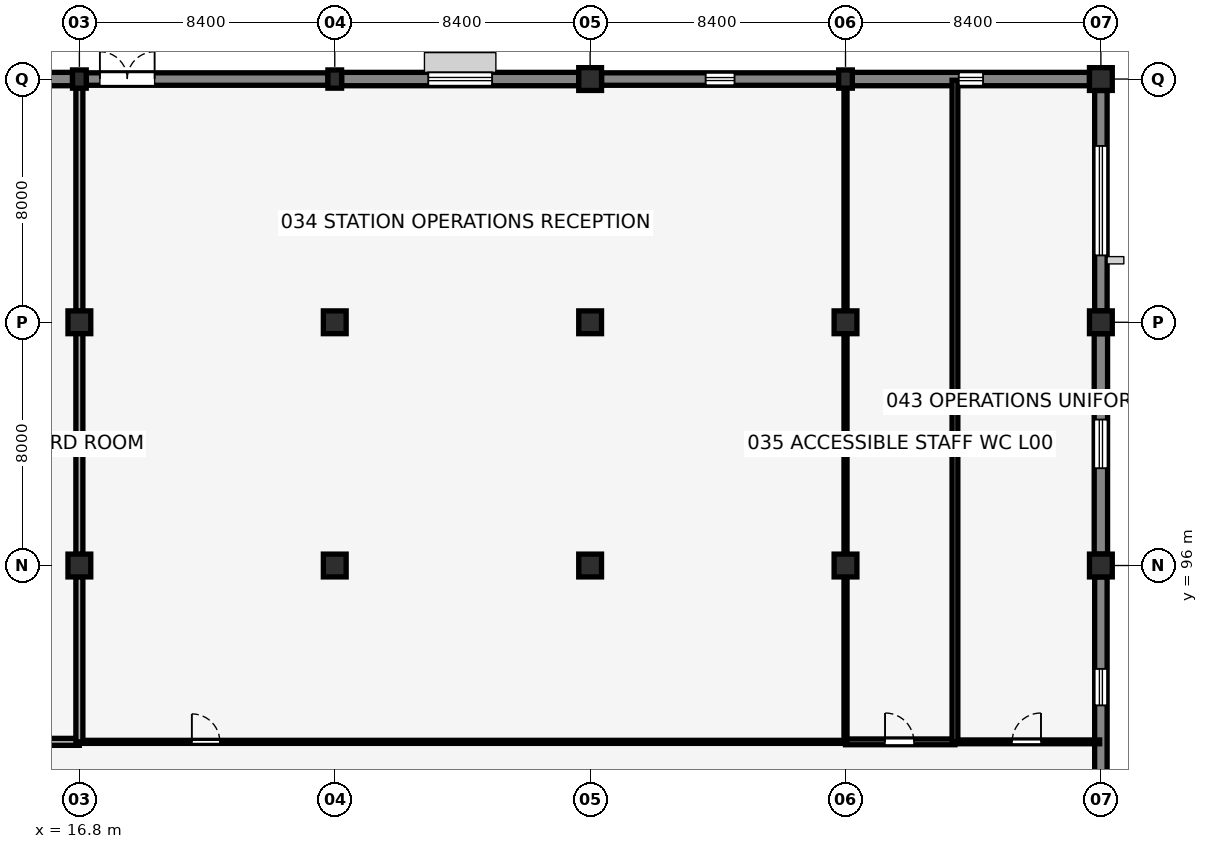
"""IFC4 building model, lengths in metres.
Left out: names, types, materials, properties, quantities, classifications, styles, units other than length and angle.
Written with IfcOpenShell. Run it as: python <this file> out.ifc"""

import sys

from ifc_helpers import new_model, si_unit, direction, frame, frame_2d, origin, origin_2d, place, context, subcontext, project, spatial, rectangle, extrude, element, fill, save


model = new_model("IFC4")
c1 = context("Model", 3, precision=1e-05, world=origin(), true_north=direction((0.0, 1.0)))
c2 = subcontext(c1, "Body", "Model", "MODEL_VIEW")
j1 = project(units=[si_unit("LENGTHUNIT", "METRE"), si_unit("PLANEANGLEUNIT", "RADIAN")], contexts=[c1])
p1 = place(None, origin())
s1 = spatial("IfcSite", under=j1, at=p1, CompositionType="ELEMENT")
p2 = place(p1, origin())
s2 = spatial("IfcBuilding", under=s1, at=p2, CompositionType="ELEMENT")
p3 = place(p2, origin())
s3 = spatial("IfcBuildingStorey", under=s2, at=p3, CompositionType="ELEMENT", Elevation=0.0)
for number, where, z_axis, x_axis in (
    (1, (16.8, 96.0, 0.0), (0.0, 0.0, 1.0), (1.0, 0.0, 0.0)),
    (2, (16.8, 104.0, 0.0), (0.0, 0.0, 1.0), (1.0, 0.0, 0.0)),
):
    element("IfcColumn", number, at=place(p3, frame(where, z_axis=z_axis, x_axis=x_axis)), inside=s3, PredefinedType="COLUMN", context=c2, shape_type="SweptSolid", body=[
        extrude(rectangle(XDim=0.75, YDim=0.75, at=origin_2d()), origin(), (0.0, 0.0, 1.0), 5.15),
    ])
p4 = place(p3, frame((16.8, 112.0, 0.0), z_axis=(0.0, 0.0, 1.0), x_axis=(1.0, 0.0, 0.0)))
e3 = element("IfcColumn", 3, at=p4, inside=s3, PredefinedType="PILASTER", context=c2, shape_type="SweptSolid", body=[
    extrude(rectangle(XDim=0.45, YDim=0.6, at=origin_2d()), origin(), (0.0, 0.0, 1.0), 5.15),
])
for number, where, z_axis, x_axis in (
    (4, (25.2, 96.0, 0.0), (0.0, 0.0, 1.0), (1.0, 0.0, 0.0)),
    (5, (25.2, 104.0, 0.0), (0.0, 0.0, 1.0), (1.0, 0.0, 0.0)),
):
    element("IfcColumn", number, at=place(p3, frame(where, z_axis=z_axis, x_axis=x_axis)), inside=s3, PredefinedType="COLUMN", context=c2, shape_type="SweptSolid", body=[
        extrude(rectangle(XDim=0.75, YDim=0.75, at=origin_2d()), origin(), (0.0, 0.0, 1.0), 5.15),
    ])
p5 = place(p3, frame((25.2, 112.0, 0.0), z_axis=(0.0, 0.0, 1.0), x_axis=(1.0, 0.0, 0.0)))
e6 = element("IfcColumn", 6, at=p5, inside=s3, PredefinedType="PILASTER", context=c2, shape_type="SweptSolid", body=[
    extrude(rectangle(XDim=0.45, YDim=0.6, at=origin_2d()), origin(), (0.0, 0.0, 1.0), 5.15),
])
for number, where, z_axis, x_axis in (
    (7, (33.6, 96.0, 0.0), (0.0, 0.0, 1.0), (1.0, 0.0, 0.0)),
    (8, (33.6, 104.0, 0.0), (0.0, 0.0, 1.0), (1.0, 0.0, 0.0)),
    (9, (33.6, 112.0, 0.0), (0.0, 0.0, 1.0), (1.0, 0.0, 0.0)),
    (10, (42.0, 96.0, 0.0), (0.0, 0.0, 1.0), (1.0, 0.0, 0.0)),
    (11, (42.0, 104.0, 0.0), (0.0, 0.0, 1.0), (1.0, 0.0, 0.0)),
):
    element("IfcColumn", number, at=place(p3, frame(where, z_axis=z_axis, x_axis=x_axis)), inside=s3, PredefinedType="COLUMN", context=c2, shape_type="SweptSolid", body=[
        extrude(rectangle(XDim=0.75, YDim=0.75, at=origin_2d()), origin(), (0.0, 0.0, 1.0), 5.15),
    ])
p6 = place(p3, frame((42.0, 112.0, 0.0), z_axis=(0.0, 0.0, 1.0), x_axis=(1.0, 0.0, 0.0)))
e12 = element("IfcColumn", 12, at=p6, inside=s3, PredefinedType="PILASTER", context=c2, shape_type="SweptSolid", body=[
    extrude(rectangle(XDim=0.45, YDim=0.6, at=origin_2d()), origin(), (0.0, 0.0, 1.0), 5.15),
])
for number, where, z_axis, x_axis in (
    (13, (50.4, 96.0, 0.0), (0.0, 0.0, 1.0), (1.0, 0.0, 0.0)),
    (14, (50.4, 104.0, 0.0), (0.0, 0.0, 1.0), (1.0, 0.0, 0.0)),
    (15, (50.4, 112.0, 0.0), (0.0, 0.0, 1.0), (1.0, 0.0, 0.0)),
):
    element("IfcColumn", number, at=place(p3, frame(where, z_axis=z_axis, x_axis=x_axis)), inside=s3, PredefinedType="COLUMN", context=c2, shape_type="SweptSolid", body=[
        extrude(rectangle(XDim=0.75, YDim=0.75, at=origin_2d()), origin(), (0.0, 0.0, 1.0), 5.15),
    ])
p7 = place(p3, frame((8.625, 112.0, 0.0), z_axis=(0.0, 0.0, 1.0), x_axis=(1.0, 0.0, 0.0)))
e16 = element("IfcWall", 16, at=p7, inside=s3, PredefinedType="SOLIDWALL", context=c2, shape_type="SweptSolid", body=[
    extrude(rectangle(XDim=7.95, YDim=0.44, at=frame_2d((3.975, 0.0))), origin(), (0.0, 0.0, 1.0), 4.74),
])
p8 = place(p7, frame((2.675, 0.0, 1.55), z_axis=(0.0, 0.0, 1.0), x_axis=(1.0, 0.0, 0.0)))
e17 = element("IfcOpeningElement", 17, at=p8, cuts=e16, PredefinedType="OPENING", context=c2, shape_type="SweptSolid", body=[
    extrude(rectangle(XDim=2.6, YDim=0.85, at=frame_2d((1.3, 0.425))), frame((0.0, 0.23, 0.0), z_axis=(0.0, -1.0, 0.0), x_axis=(1.0, 0.0, 0.0)), (0.0, 0.0, 1.0), 0.46),
])
p9 = place(p3, frame((17.025, 112.0, 0.0), z_axis=(0.0, 0.0, 1.0), x_axis=(1.0, 0.0, 0.0)))
e18 = element("IfcWall", 18, at=p9, inside=s3, PredefinedType="SOLIDWALL", context=c2, shape_type="SweptSolid", body=[
    extrude(rectangle(XDim=7.95, YDim=0.41, at=frame_2d((3.975, 0.0))), origin(), (0.0, 0.0, 1.0), 4.74),
])
p10 = place(p9, frame((0.45, 0.0, 0.0), z_axis=(0.0, 0.0, 1.0), x_axis=(1.0, 0.0, 0.0)))
e19 = element("IfcOpeningElement", 19, at=p10, cuts=e18, PredefinedType="OPENING", context=c2, shape_type="SweptSolid", body=[
    extrude(rectangle(XDim=1.8, YDim=2.2, at=frame_2d((0.9, 1.1))), frame((0.0, 0.215, 0.0), z_axis=(0.0, -1.0, 0.0), x_axis=(1.0, 0.0, 0.0)), (0.0, 0.0, 1.0), 0.43),
])
p11 = place(p3, frame((25.425, 112.0, 0.0), z_axis=(0.0, 0.0, 1.0), x_axis=(1.0, 0.0, 0.0)))
e20 = element("IfcWall", 20, at=p11, inside=s3, PredefinedType="SOLIDWALL", context=c2, shape_type="SweptSolid", body=[
    extrude(rectangle(XDim=7.8, YDim=0.44, at=frame_2d((3.9, 0.0))), origin(), (0.0, 0.0, 1.0), 4.74),
])
p12 = place(p11, frame((2.85, 0.0, 1.55), z_axis=(0.0, 0.0, 1.0), x_axis=(1.0, 0.0, 0.0)))
e21 = element("IfcOpeningElement", 21, at=p12, cuts=e20, PredefinedType="OPENING", context=c2, shape_type="SweptSolid", body=[
    extrude(rectangle(XDim=2.1, YDim=0.8, at=frame_2d((1.05, 0.4))), frame((0.0, 0.23, 0.0), z_axis=(0.0, -1.0, 0.0), x_axis=(1.0, 0.0, 0.0)), (0.0, 0.0, 1.0), 0.46),
])
p13 = place(p3, frame((33.975, 112.0, 0.0), z_axis=(0.0, 0.0, 1.0), x_axis=(1.0, 0.0, 0.0)))
e22 = element("IfcWall", 22, at=p13, inside=s3, PredefinedType="SOLIDWALL", context=c2, shape_type="SweptSolid", body=[
    extrude(rectangle(XDim=7.8, YDim=0.41, at=frame_2d((3.9, 0.0))), origin(), (0.0, 0.0, 1.0), 4.74),
])
p14 = place(p13, frame((3.425, 0.0, 0.65), z_axis=(0.0, 0.0, 1.0), x_axis=(1.0, 0.0, 0.0)))
e23 = element("IfcOpeningElement", 23, at=p14, cuts=e22, PredefinedType="OPENING", context=c2, shape_type="SweptSolid", body=[
    extrude(rectangle(XDim=0.95, YDim=2.1, at=frame_2d((0.475, 1.05))), frame((0.0, 0.215, 0.0), z_axis=(0.0, -1.0, 0.0), x_axis=(1.0, 0.0, 0.0)), (0.0, 0.0, 1.0), 0.43),
])
p15 = place(p3, frame((42.225, 112.0, 0.0), z_axis=(0.0, 0.0, 1.0), x_axis=(1.0, 0.0, 0.0)))
e24 = element("IfcWall", 24, at=p15, inside=s3, PredefinedType="SOLIDWALL", context=c2, shape_type="SweptSolid", body=[
    extrude(rectangle(XDim=7.8, YDim=0.44, at=frame_2d((3.9, 0.0))), origin(), (0.0, 0.0, 1.0), 4.74),
])
p16 = place(p15, frame((3.5, 0.0, 0.65), z_axis=(0.0, 0.0, 1.0), x_axis=(1.0, 0.0, 0.0)))
e25 = element("IfcOpeningElement", 25, at=p16, cuts=e24, PredefinedType="OPENING", context=c2, shape_type="SweptSolid", body=[
    extrude(rectangle(XDim=0.8, YDim=1.85, at=frame_2d((0.4, 0.925))), frame((0.0, 0.23, 0.0), z_axis=(0.0, -1.0, 0.0), x_axis=(1.0, 0.0, 0.0)), (0.0, 0.0, 1.0), 0.46),
])
p17 = place(p3, frame((50.4, 88.375, 0.0), z_axis=(0.0, 0.0, 1.0), x_axis=(0.0, 1.0, 0.0)))
e26 = element("IfcWall", 26, at=p17, inside=s3, PredefinedType="SOLIDWALL", context=c2, shape_type="SweptSolid", body=[
    extrude(rectangle(XDim=7.25, YDim=0.41, at=frame_2d((3.625, 0.0))), origin(), (0.0, 0.0, 1.0), 4.747),
])
p18 = place(p17, frame((3.025, 0.0, 1.55), z_axis=(0.0, 0.0, 1.0), x_axis=(1.0, 0.0, 0.0)))
e27 = element("IfcOpeningElement", 27, at=p18, cuts=e26, PredefinedType="OPENING", context=c2, shape_type="SweptSolid", body=[
    extrude(rectangle(XDim=1.2, YDim=0.95, at=frame_2d((0.6, 0.475))), frame((0.0, 0.215, 0.0), z_axis=(0.0, -1.0, 0.0), x_axis=(1.0, 0.0, 0.0)), (0.0, 0.0, 1.0), 0.43),
])
p19 = place(p3, frame((50.4, 96.375, 0.0), z_axis=(0.0, 0.0, 1.0), x_axis=(0.0, 1.0, 0.0)))
e28 = element("IfcWall", 28, at=p19, inside=s3, PredefinedType="SOLIDWALL", context=c2, shape_type="SweptSolid", body=[
    extrude(rectangle(XDim=7.25, YDim=0.44, at=frame_2d((3.625, 0.0))), origin(), (0.0, 0.0, 1.0), 4.747),
])
p20 = place(p19, frame((2.825, 0.0, 0.9), z_axis=(0.0, 0.0, 1.0), x_axis=(1.0, 0.0, 0.0)))
e29 = element("IfcOpeningElement", 29, at=p20, cuts=e28, PredefinedType="OPENING", context=c2, shape_type="SweptSolid", body=[
    extrude(rectangle(XDim=1.6, YDim=1.2, at=frame_2d((0.8, 0.6))), frame((0.0, 0.23, 0.0), z_axis=(0.0, -1.0, 0.0), x_axis=(1.0, 0.0, 0.0)), (0.0, 0.0, 1.0), 0.46),
])
p21 = place(p3, frame((50.4, 104.375, 0.0), z_axis=(0.0, 0.0, 1.0), x_axis=(0.0, 1.0, 0.0)))
e30 = element("IfcWall", 30, at=p21, inside=s3, PredefinedType="SOLIDWALL", context=c2, shape_type="SweptSolid", body=[
    extrude(rectangle(XDim=7.25, YDim=0.41, at=frame_2d((3.625, 0.0))), origin(), (0.0, 0.0, 1.0), 4.747),
])
p22 = place(p21, frame((1.825, 0.0, 0.9), z_axis=(0.0, 0.0, 1.0), x_axis=(1.0, 0.0, 0.0)))
e31 = element("IfcOpeningElement", 31, at=p22, cuts=e30, PredefinedType="OPENING", context=c2, shape_type="SweptSolid", body=[
    extrude(rectangle(XDim=3.6, YDim=1.8, at=frame_2d((1.8, 0.9))), frame((0.0, 0.215, 0.0), z_axis=(0.0, -1.0, 0.0), x_axis=(1.0, 0.0, 0.0)), (0.0, 0.0, 1.0), 0.43),
])
p23 = place(p3, frame((8.4, 90.2, 0.0), z_axis=(0.0, 0.0, 1.0), x_axis=(1.0, 0.0, 0.0)))
e32 = element("IfcWall", 32, at=p23, inside=s3, PredefinedType="PARTITIONING", context=c2, shape_type="SweptSolid", body=[
    extrude(rectangle(XDim=8.4, YDim=0.23, at=frame_2d((4.2, 0.0))), origin(), (0.0, 0.0, 1.0), 5.15),
])
p24 = place(p23, frame((3.7, 0.0, 0.0), z_axis=(0.0, 0.0, 1.0), x_axis=(1.0, 0.0, 0.0)))
e33 = element("IfcOpeningElement", 33, at=p24, cuts=e32, PredefinedType="OPENING", context=c2, shape_type="SweptSolid", body=[
    extrude(rectangle(XDim=1.0, YDim=2.15, at=frame_2d((0.5, 1.075))), frame((0.0, 0.125, 0.0), z_axis=(0.0, -1.0, 0.0), x_axis=(1.0, 0.0, 0.0)), (0.0, 0.0, 1.0), 0.25),
])
p25 = place(p3, frame((16.8, 90.2, 0.0), z_axis=(0.0, 0.0, 1.0), x_axis=(1.0, 0.0, 0.0)))
e34 = element("IfcWall", 34, at=p25, inside=s3, PredefinedType="PARTITIONING", context=c2, shape_type="SweptSolid", body=[
    extrude(rectangle(XDim=25.2, YDim=0.1, at=frame_2d((12.6, 0.0))), origin(), (0.0, 0.0, 1.0), 4.542),
])
p26 = place(p25, frame((3.7, 0.0, 0.0), z_axis=(0.0, 0.0, 1.0), x_axis=(1.0, 0.0, 0.0)))
e35 = element("IfcOpeningElement", 35, at=p26, cuts=e34, PredefinedType="OPENING", context=c2, shape_type="SweptSolid", body=[
    extrude(rectangle(XDim=0.92, YDim=2.12, at=frame_2d((0.46, 1.06))), frame((0.0, 0.06, 0.0), z_axis=(0.0, -1.0, 0.0), x_axis=(1.0, 0.0, 0.0)), (0.0, 0.0, 1.0), 0.12),
])
p27 = place(p3, frame((42.0, 90.2, 0.0), z_axis=(0.0, 0.0, 1.0), x_axis=(1.0, 0.0, 0.0)))
e36 = element("IfcWall", 36, at=p27, inside=s3, PredefinedType="PLUMBINGWALL", context=c2, shape_type="SweptSolid", body=[
    extrude(rectangle(XDim=3.6, YDim=0.19, at=frame_2d((1.8, 0.0))), origin(), (0.0, 0.0, 1.0), 5.15),
])
p28 = place(p27, frame((1.3, 0.0, 0.0), z_axis=(0.0, 0.0, 1.0), x_axis=(1.0, 0.0, 0.0)))
e37 = element("IfcOpeningElement", 37, at=p28, cuts=e36, PredefinedType="OPENING", context=c2, shape_type="SweptSolid", body=[
    extrude(rectangle(XDim=0.95, YDim=2.15, at=frame_2d((0.475, 1.075))), frame((0.0, 0.105, 0.0), z_axis=(0.0, -1.0, 0.0), x_axis=(1.0, 0.0, 0.0)), (0.0, 0.0, 1.0), 0.21),
])
p29 = place(p3, frame((45.6, 90.2, 0.0), z_axis=(0.0, 0.0, 1.0), x_axis=(1.0, 0.0, 0.0)))
e38 = element("IfcWall", 38, at=p29, inside=s3, PredefinedType="PARTITIONING", context=c2, shape_type="SweptSolid", body=[
    extrude(rectangle(XDim=4.76, YDim=0.125, at=frame_2d((2.38, 0.0))), origin(), (0.0, 0.0, 1.0), 5.15),
])
p30 = place(p29, frame((1.88, 0.0, 0.0), z_axis=(0.0, 0.0, 1.0), x_axis=(1.0, 0.0, 0.0)))
e39 = element("IfcOpeningElement", 39, at=p30, cuts=e38, PredefinedType="OPENING", context=c2, shape_type="SweptSolid", body=[
    extrude(rectangle(XDim=0.95, YDim=2.15, at=frame_2d((0.475, 1.075))), frame((0.0, 0.073, 0.0), z_axis=(0.0, -1.0, 0.0), x_axis=(1.0, 0.0, 0.0)), (0.0, 0.0, 1.0), 0.145),
])
p31 = place(p3, frame((16.8, 90.2, 0.0), z_axis=(0.0, 0.0, 1.0), x_axis=(0.0, 1.0, 0.0)))
e40 = element("IfcWall", 40, at=p31, inside=s3, PredefinedType="PARTITIONING", context=c2, shape_type="SweptSolid", body=[
    extrude(rectangle(XDim=5.435, YDim=0.23, at=frame_2d((2.718, 0.0))), origin(), (0.0, 0.0, 1.0), 4.542),
])
p32 = place(p3, frame((16.8, 96.365, 0.0), z_axis=(0.0, 0.0, 1.0), x_axis=(0.0, 1.0, 0.0)))
e41 = element("IfcWall", 41, at=p32, inside=s3, PredefinedType="PARTITIONING", context=c2, shape_type="SweptSolid", body=[
    extrude(rectangle(XDim=7.27, YDim=0.23, at=frame_2d((3.635, 0.0))), origin(), (0.0, 0.0, 1.0), 4.542),
])
p33 = place(p3, frame((16.8, 104.365, 0.0), z_axis=(0.0, 0.0, 1.0), x_axis=(0.0, 1.0, 0.0)))
e42 = element("IfcWall", 42, at=p33, inside=s3, PredefinedType="PARTITIONING", context=c2, shape_type="SweptSolid", body=[
    extrude(rectangle(XDim=7.345, YDim=0.23, at=frame_2d((3.672, 0.0))), origin(), (0.0, 0.0, 1.0), 4.542),
])
p34 = place(p3, frame((42.0, 90.2, 0.0), z_axis=(0.0, 0.0, 1.0), x_axis=(0.0, 1.0, 0.0)))
e43 = element("IfcWall", 43, at=p34, inside=s3, PredefinedType="PARTITIONING", context=c2, shape_type="SweptSolid", body=[
    extrude(rectangle(XDim=5.435, YDim=0.1, at=frame_2d((2.718, 0.0))), origin(), (0.0, 0.0, 1.0), 4.542),
])
p35 = place(p3, frame((42.0, 96.365, 0.0), z_axis=(0.0, 0.0, 1.0), x_axis=(0.0, 1.0, 0.0)))
e44 = element("IfcWall", 44, at=p35, inside=s3, PredefinedType="PARTITIONING", context=c2, shape_type="SweptSolid", body=[
    extrude(rectangle(XDim=7.27, YDim=0.1, at=frame_2d((3.635, 0.0))), origin(), (0.0, 0.0, 1.0), 4.542),
])
p36 = place(p3, frame((42.0, 104.365, 0.0), z_axis=(0.0, 0.0, 1.0), x_axis=(0.0, 1.0, 0.0)))
e45 = element("IfcWall", 45, at=p36, inside=s3, PredefinedType="PARTITIONING", context=c2, shape_type="SweptSolid", body=[
    extrude(rectangle(XDim=7.345, YDim=0.1, at=frame_2d((3.672, 0.0))), origin(), (0.0, 0.0, 1.0), 4.542),
])
p37 = place(p3, frame((45.6, 90.2, 0.0), z_axis=(0.0, 0.0, 1.0), x_axis=(0.0, 1.0, 0.0)))
e46 = element("IfcWall", 46, at=p37, inside=s3, PredefinedType="PLUMBINGWALL", context=c2, shape_type="SweptSolid", body=[
    extrude(rectangle(XDim=21.76, YDim=0.19, at=frame_2d((10.88, 0.0))), origin(), (0.0, 0.0, 1.0), 5.15),
])
p38 = place(p10, origin())
e47 = element("IfcDoor", 47, at=p38, inside=s3, OperationType="DOUBLE_DOOR_SINGLE_SWING", PredefinedType="DOOR", context=c2, shape_type="SweptSolid", body=[
    extrude(rectangle(XDim=1.8, YDim=2.2, at=frame_2d((0.9, 1.1))), frame((0.0, 0.025, 0.0), z_axis=(0.0, -1.0, 0.0), x_axis=(1.0, 0.0, 0.0)), (0.0, 0.0, 1.0), 0.05),
])
fill(e19, e47)
p39 = place(p12, origin())
e48 = element("IfcWindow", 48, at=p39, inside=s3, PartitioningType="DOUBLE_PANEL_HORIZONTAL", PredefinedType="WINDOW", context=c2, shape_type="SweptSolid", body=[
    extrude(rectangle(XDim=2.1, YDim=0.8, at=frame_2d((1.05, 0.4))), frame((0.0, 0.03, 0.0), z_axis=(0.0, -1.0, 0.0), x_axis=(1.0, 0.0, 0.0)), (0.0, 0.0, 1.0), 0.06),
])
fill(e21, e48)
p40 = place(p14, origin())
e49 = element("IfcWindow", 49, at=p40, inside=s3, PartitioningType="SINGLE_PANEL", PredefinedType="WINDOW", context=c2, shape_type="SweptSolid", body=[
    extrude(rectangle(XDim=0.95, YDim=2.1, at=frame_2d((0.475, 1.05))), frame((0.0, 0.03, 0.0), z_axis=(0.0, -1.0, 0.0), x_axis=(1.0, 0.0, 0.0)), (0.0, 0.0, 1.0), 0.06),
])
fill(e23, e49)
p41 = place(p16, origin())
e50 = element("IfcWindow", 50, at=p41, inside=s3, PartitioningType="SINGLE_PANEL", PredefinedType="WINDOW", context=c2, shape_type="SweptSolid", body=[
    extrude(rectangle(XDim=0.8, YDim=1.85, at=frame_2d((0.4, 0.925))), frame((0.0, 0.03, 0.0), z_axis=(0.0, -1.0, 0.0), x_axis=(1.0, 0.0, 0.0)), (0.0, 0.0, 1.0), 0.06),
])
fill(e25, e50)
p42 = place(p18, origin())
e51 = element("IfcWindow", 51, at=p42, inside=s3, PartitioningType="SINGLE_PANEL", PredefinedType="WINDOW", context=c2, shape_type="SweptSolid", body=[
    extrude(rectangle(XDim=1.2, YDim=0.95, at=frame_2d((0.6, 0.475))), frame((0.0, 0.03, 0.0), z_axis=(0.0, -1.0, 0.0), x_axis=(1.0, 0.0, 0.0)), (0.0, 0.0, 1.0), 0.06),
])
fill(e27, e51)
p43 = place(p20, origin())
e52 = element("IfcWindow", 52, at=p43, inside=s3, PartitioningType="DOUBLE_PANEL_VERTICAL", PredefinedType="WINDOW", context=c2, shape_type="SweptSolid", body=[
    extrude(rectangle(XDim=1.6, YDim=1.2, at=frame_2d((0.8, 0.6))), frame((0.0, 0.03, 0.0), z_axis=(0.0, -1.0, 0.0), x_axis=(1.0, 0.0, 0.0)), (0.0, 0.0, 1.0), 0.06),
])
fill(e29, e52)
p44 = place(p22, origin())
e53 = element("IfcWindow", 53, at=p44, inside=s3, PartitioningType="TRIPLE_PANEL_VERTICAL", PredefinedType="WINDOW", context=c2, shape_type="SweptSolid", body=[
    extrude(rectangle(XDim=3.6, YDim=1.8, at=frame_2d((1.8, 0.9))), frame((0.0, 0.03, 0.0), z_axis=(0.0, -1.0, 0.0), x_axis=(1.0, 0.0, 0.0)), (0.0, 0.0, 1.0), 0.06),
])
fill(e31, e53)
p45 = place(p26, origin())
e54 = element("IfcDoor", 54, at=p45, inside=s3, OperationType="SINGLE_SWING_LEFT", PredefinedType="DOOR", context=c2, shape_type="SweptSolid", body=[
    extrude(rectangle(XDim=0.92, YDim=2.12, at=frame_2d((0.46, 1.06))), frame((0.0, 0.025, 0.0), z_axis=(0.0, -1.0, 0.0), x_axis=(1.0, 0.0, 0.0)), (0.0, 0.0, 1.0), 0.05),
])
fill(e35, e54)
p46 = place(p28, origin())
e55 = element("IfcDoor", 55, at=p46, inside=s3, OperationType="SINGLE_SWING_LEFT", PredefinedType="DOOR", context=c2, shape_type="SweptSolid", body=[
    extrude(rectangle(XDim=0.95, YDim=2.15, at=frame_2d((0.475, 1.075))), frame((0.0, 0.025, 0.0), z_axis=(0.0, -1.0, 0.0), x_axis=(1.0, 0.0, 0.0)), (0.0, 0.0, 1.0), 0.05),
])
fill(e37, e55)
p47 = place(p30, origin())
e56 = element("IfcDoor", 56, at=p47, inside=s3, OperationType="SINGLE_SWING_RIGHT", PredefinedType="DOOR", context=c2, shape_type="SweptSolid", body=[
    extrude(rectangle(XDim=0.95, YDim=2.15, at=frame_2d((0.475, 1.075))), frame((0.0, 0.025, 0.0), z_axis=(0.0, -1.0, 0.0), x_axis=(1.0, 0.0, 0.0)), (0.0, 0.0, 1.0), 0.05),
])
fill(e39, e56)
save(model, sys.argv[1])
